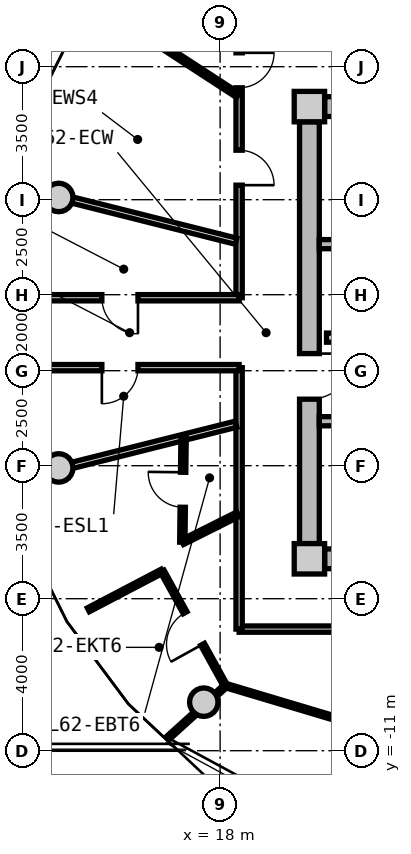
"""IFC4 building model, lengths in metres.
Left out: names, types, materials, properties, quantities, classifications, styles, units other than length and angle.
Written with IfcOpenShell. Run it as: python <this file> out.ifc"""

import sys

from ifc_helpers import new_model, si_unit, direction, frame, frame_2d, origin, origin_2d, place, context, subcontext, project, spatial, rectangle, circle, extrude, source, transform, mapped, element, fill, save


model = new_model("IFC4")
c1 = context("Model", 3, precision=1e-05, world=origin(), true_north=direction((0.0, 1.0)))
c2 = subcontext(c1, "Body", "Model", "MODEL_VIEW")
j1 = project(units=[si_unit("LENGTHUNIT", "METRE"), si_unit("PLANEANGLEUNIT", "RADIAN")], contexts=[c1])
p1 = place(None, origin())
s1 = spatial("IfcSite", under=j1, at=p1, CompositionType="ELEMENT")
p2 = place(p1, origin())
s2 = spatial("IfcBuilding", under=s1, at=p2, CompositionType="ELEMENT")
p3 = place(p2, frame((0.0, 0.0, 199.8)))
s3 = spatial("IfcBuildingStorey", under=s2, at=p3, CompositionType="ELEMENT", Elevation=199.8)
m1 = source(origin(), c2, "Body", "SweptSolid", [
    extrude(rectangle(XDim=0.8, YDim=0.8, at=origin_2d()), origin(), (0.0, 0.0, 1.0), 4.0),
])
for number, where, z_axis, x_axis in (
    (1, (20.35, -5.95, 0.0), (0.0, 0.0, 1.0), (1.0, 0.0, 0.0)),
    (2, (20.35, 5.95, 0.0), (0.0, 0.0, 1.0), (1.0, 0.0, 0.0)),
):
    element("IfcColumn", number, at=place(p3, frame(where, z_axis=z_axis, x_axis=x_axis)), inside=s3, PredefinedType="COLUMN", context=c2, shape_type="MappedRepresentation", body=[
        mapped(m1, transform((0.0, 0.0, 0.0), x_axis=(1.0, 0.0, 0.0), y_axis=(0.0, 1.0, 0.0), z_axis=(0.0, 0.0, 1.0), scale=1.0)),
    ])
m2 = source(origin(), c2, "Body", "SweptSolid", [
    extrude(rectangle(XDim=14.5, YDim=0.52, at=frame_2d((7.25, 0.0))), origin(), (0.0, 0.0, 1.0), 3.71),
])
for number, where, z_axis, x_axis in (
    (3, (20.75, 5.95, 0.0), (0.0, 0.0, 1.0), (1.0, 0.0, 0.0)),
    (4, (35.25, -5.95, 0.0), (0.0, 0.0, 1.0), (-1.0, 0.0, 0.0)),
):
    element("IfcWall", number, at=place(p3, frame(where, z_axis=z_axis, x_axis=x_axis)), inside=s3, PredefinedType="SHEAR", context=c2, shape_type="MappedRepresentation", body=[
        mapped(m2, transform((0.0, 0.0, 0.0), x_axis=(1.0, 0.0, 0.0), y_axis=(0.0, 1.0, 0.0), z_axis=(0.0, 0.0, 1.0), scale=1.0)),
    ])
m3 = source(origin(), c2, "Body", "SweptSolid", [
    extrude(rectangle(XDim=11.1, YDim=0.52, at=frame_2d((5.55, 0.0))), origin(), (0.0, 0.0, 1.0), 3.71),
])
p4 = place(p3, frame((20.35, -5.55, 0.0), z_axis=(0.0, 0.0, 1.0), x_axis=(0.0, 1.0, 0.0)))
e5 = element("IfcWall", 5, at=p4, inside=s3, PredefinedType="SHEAR", context=c2, shape_type="MappedRepresentation", body=[
    mapped(m3, transform((0.0, 0.0, 0.0), x_axis=(1.0, 0.0, 0.0), y_axis=(0.0, 1.0, 0.0), z_axis=(0.0, 0.0, 1.0), scale=1.0)),
])
p5 = place(p4, frame((3.8, 0.0, 0.0)))
e6 = element("IfcOpeningElement", 6, at=p5, cuts=e5, PredefinedType="OPENING", context=c2, shape_type="SweptSolid", body=[
    extrude(rectangle(XDim=1.2, YDim=2.15, at=frame_2d((0.6, 1.075))), frame((0.0, 0.27, 0.0), z_axis=(0.0, -1.0, 0.0), x_axis=(1.0, 0.0, 0.0)), (0.0, 0.0, 1.0), 0.54),
])
m4 = source(origin(), c2, "Body", "SweptSolid", [
    extrude(circle(Radius=0.375, at=origin_2d()), origin(), (0.0, 0.0, 1.0), 4.0),
])
for number, where, z_axis, x_axis in (
    (7, (13.753, 3.559, 0.0), (0.0, 0.0, 1.0), (1.0, 0.0, 0.0)),
    (8, (13.753, -3.559, 0.0), (0.0, 0.0, 1.0), (1.0, 0.0, 0.0)),
    (9, (17.57, -9.723, 0.0), (0.0, 0.0, 1.0), (1.0, 0.0, 0.0)),
):
    element("IfcColumn", number, at=place(p3, frame(where, z_axis=z_axis, x_axis=x_axis)), inside=s3, PredefinedType="COLUMN", context=c2, shape_type="MappedRepresentation", body=[
        mapped(m4, transform((0.0, 0.0, 0.0), x_axis=(1.0, 0.0, 0.0), y_axis=(0.0, 1.0, 0.0), z_axis=(0.0, 0.0, 1.0), scale=1.0)),
    ])
m5 = source(origin(), c2, "Body", "SweptSolid", [
    extrude(rectangle(XDim=7.93, YDim=0.24, at=frame_2d((3.965, 0.0))), origin(), (0.0, 0.0, 1.0), 3.71),
])
p6 = place(p3, frame((20.61, 2.33, 0.0), z_axis=(0.0, 0.0, 1.0), x_axis=(1.0, 0.0, 0.0)))
e10 = element("IfcWall", 10, at=p6, inside=s3, PredefinedType="PARTITIONING", context=c2, shape_type="MappedRepresentation", body=[
    mapped(m5, transform((0.0, 0.0, 0.0), x_axis=(1.0, 0.0, 0.0), y_axis=(0.0, 1.0, 0.0), z_axis=(0.0, 0.0, 1.0), scale=1.0)),
])
p7 = place(p3, frame((20.61, -2.33, 0.0), z_axis=(0.0, 0.0, 1.0), x_axis=(1.0, 0.0, 0.0)))
e11 = element("IfcWall", 11, at=p7, inside=s3, PredefinedType="PARTITIONING", context=c2, shape_type="MappedRepresentation", body=[
    mapped(m5, transform((0.0, 0.0, 0.0), x_axis=(1.0, 0.0, 0.0), y_axis=(0.0, 1.0, 0.0), z_axis=(0.0, 0.0, 1.0), scale=1.0)),
])
p8 = place(p7, frame((1.05, 0.0, 0.0)))
e12 = element("IfcOpeningElement", 12, at=p8, cuts=e11, PredefinedType="OPENING", context=c2, shape_type="SweptSolid", body=[
    extrude(rectangle(XDim=1.1, YDim=2.15, at=frame_2d((0.55, 1.075))), frame((0.0, 0.13, 0.0), z_axis=(0.0, -1.0, 0.0), x_axis=(1.0, 0.0, 0.0)), (0.0, 0.0, 1.0), 0.26),
])
m6 = source(origin(), c2, "Body", "SweptSolid", [
    extrude(rectangle(XDim=7.62, YDim=0.24, at=frame_2d((3.81, 0.0))), origin(), (0.0, 0.0, 1.0), 3.695),
])
p9 = place(p3, frame((20.8, -0.13, 0.0), z_axis=(0.0, 0.0, 1.0), x_axis=(1.0, 0.0, 0.0)))
e13 = element("IfcWall", 13, at=p9, inside=s3, PredefinedType="PARTITIONING", context=c2, shape_type="MappedRepresentation", body=[
    mapped(m6, transform((0.0, 0.0, 0.0), x_axis=(1.0, 0.0, 0.0), y_axis=(0.0, 1.0, 0.0), z_axis=(0.0, 0.0, 1.0), scale=1.0)),
])
p10 = place(p9, frame((6.22, 0.0, 0.0)))
e14 = element("IfcOpeningElement", 14, at=p10, cuts=e13, PredefinedType="OPENING", context=c2, shape_type="SweptSolid", body=[
    extrude(rectangle(XDim=1.0, YDim=2.1, at=frame_2d((0.5, 1.05))), frame((0.0, 0.13, 0.0), z_axis=(0.0, -1.0, 0.0), x_axis=(1.0, 0.0, 0.0)), (0.0, 0.0, 1.0), 0.26),
])
p11 = place(p9, frame((2.4, 0.0, 0.0)))
e15 = element("IfcOpeningElement", 15, at=p11, cuts=e13, PredefinedType="OPENING", context=c2, shape_type="SweptSolid", body=[
    extrude(rectangle(XDim=1.0, YDim=2.1, at=frame_2d((0.5, 1.05))), frame((0.0, 0.13, 0.0), z_axis=(0.0, -1.0, 0.0), x_axis=(1.0, 0.0, 0.0)), (0.0, 0.0, 1.0), 0.26),
])
m7 = source(origin(), c2, "Body", "SweptSolid", [
    extrude(rectangle(XDim=19.0, YDim=0.165, at=frame_2d((9.5, 0.0))), origin(), (0.0, 0.0, 1.0), 3.695),
])
p12 = place(p3, frame((37.5, -7.8, 0.0), z_axis=(0.0, 0.0, 1.0), x_axis=(-1.0, 0.0, 0.0)))
e16 = element("IfcWall", 16, at=p12, inside=s3, PredefinedType="PARTITIONING", context=c2, shape_type="MappedRepresentation", body=[
    mapped(m7, transform((0.0, 0.0, 0.0), x_axis=(1.0, 0.0, 0.0), y_axis=(0.0, 1.0, 0.0), z_axis=(0.0, 0.0, 1.0), scale=1.0)),
])
p13 = place(p12, frame((9.392, 0.0, 0.0)))
e17 = element("IfcOpeningElement", 17, at=p13, cuts=e16, PredefinedType="OPENING", context=c2, shape_type="SweptSolid", body=[
    extrude(rectangle(XDim=1.05, YDim=2.15, at=frame_2d((0.525, 1.075))), frame((0.0, 0.093, 0.0), z_axis=(0.0, -1.0, 0.0), x_axis=(1.0, 0.0, 0.0)), (0.0, 0.0, 1.0), 0.185),
])
m8 = source(origin(), c2, "Body", "SweptSolid", [
    extrude(rectangle(XDim=6.88, YDim=0.165, at=frame_2d((3.44, 0.0))), origin(), (0.0, 0.0, 1.0), 3.695),
])
p14 = place(p3, frame((18.5, -7.8, 0.0), z_axis=(0.0, 0.0, 1.0), x_axis=(0.0, 1.0, 0.0)))
e18 = element("IfcWall", 18, at=p14, inside=s3, PredefinedType="PARTITIONING", context=c2, shape_type="MappedRepresentation", body=[
    mapped(m8, transform((0.0, 0.0, 0.0), x_axis=(1.0, 0.0, 0.0), y_axis=(0.0, 1.0, 0.0), z_axis=(0.0, 0.0, 1.0), scale=1.0)),
])
p15 = place(p3, frame((18.5, 0.92, 0.0), z_axis=(0.0, 0.0, 1.0), x_axis=(0.0, 1.0, 0.0)))
e19 = element("IfcWall", 19, at=p15, inside=s3, PredefinedType="PARTITIONING", context=c2, shape_type="MappedRepresentation", body=[
    mapped(m8, transform((0.0, 0.0, 0.0), x_axis=(1.0, 0.0, 0.0), y_axis=(0.0, 1.0, 0.0), z_axis=(0.0, 0.0, 1.0), scale=1.0)),
])
p16 = place(p15, frame((5.525, 0.0, 0.0)))
e20 = element("IfcOpeningElement", 20, at=p16, cuts=e19, PredefinedType="OPENING", context=c2, shape_type="SweptSolid", body=[
    extrude(rectangle(XDim=0.92, YDim=2.1, at=frame_2d((0.46, 1.05))), frame((0.0, 0.093, 0.0), z_axis=(0.0, -1.0, 0.0), x_axis=(1.0, 0.0, 0.0)), (0.0, 0.0, 1.0), 0.185),
])
p17 = place(p15, frame((2.962, 0.0, 0.0)))
e21 = element("IfcOpeningElement", 21, at=p17, cuts=e19, PredefinedType="OPENING", context=c2, shape_type="SweptSolid", body=[
    extrude(rectangle(XDim=0.92, YDim=2.1, at=frame_2d((0.46, 1.05))), frame((0.0, 0.093, 0.0), z_axis=(0.0, -1.0, 0.0), x_axis=(1.0, 0.0, 0.0)), (0.0, 0.0, 1.0), 0.185),
])
m9 = source(origin(), c2, "Body", "SweptSolid", [
    extrude(rectangle(XDim=6.157, YDim=0.165, at=frame_2d((3.079, 0.0))), origin(), (0.0, 0.0, 1.0), 3.295),
])
for number, where, z_axis, x_axis in (
    (22, (18.42, 2.407, 0.0), (0.0, 0.0, 1.0), (-0.97, 0.244, 0.0)),
    (23, (18.42, -2.407, 0.0), (0.0, 0.0, 1.0), (-0.97, -0.244, 0.0)),
):
    element("IfcWall", number, at=place(p3, frame(where, z_axis=z_axis, x_axis=x_axis)), inside=s3, PredefinedType="PARTITIONING", context=c2, shape_type="MappedRepresentation", body=[
        mapped(m9, transform((0.0, 0.0, 0.0), x_axis=(1.0, 0.0, 0.0), y_axis=(0.0, 1.0, 0.0), z_axis=(0.0, 0.0, 1.0), scale=1.0)),
    ])
m10 = source(origin(), c2, "Body", "SweptSolid", [
    extrude(rectangle(XDim=3.904, YDim=0.14, at=frame_2d((1.952, 0.0))), origin(), (0.0, 0.0, 1.0), 3.695),
])
p18 = place(p3, frame((18.47, 6.246, 0.0), z_axis=(0.0, 0.0, 1.0), x_axis=(-0.838024687996, 0.545632314209, 0.0)))
e24 = element("IfcWall", 24, at=p18, inside=s3, PredefinedType="PARTITIONING", context=c2, shape_type="MappedRepresentation", body=[
    mapped(m10, transform((0.0, 0.0, 0.0), x_axis=(1.0, 0.0, 0.0), y_axis=(0.0, 1.0, 0.0), z_axis=(0.0, 0.0, 1.0), scale=1.0)),
])
m11 = source(origin(), c2, "Body", "SweptSolid", [
    extrude(rectangle(XDim=6.936, YDim=0.115, at=frame_2d((3.468, 0.0))), origin(), (0.0, 0.0, 1.0), 3.695),
])
p19 = place(p3, frame((18.151, -9.287, 0.0), z_axis=(0.0, 0.0, 1.0), x_axis=(0.958186895835, -0.286143098205, 0.0)))
e25 = element("IfcWall", 25, at=p19, inside=s3, PredefinedType="PARTITIONING", context=c2, shape_type="MappedRepresentation", body=[
    mapped(m11, transform((0.0, 0.0, 0.0), x_axis=(1.0, 0.0, 0.0), y_axis=(0.0, 1.0, 0.0), z_axis=(0.0, 0.0, 1.0), scale=1.0)),
])
p20 = place(p19, frame((2.993, 0.0, 0.0)))
e26 = element("IfcOpeningElement", 26, at=p20, cuts=e25, PredefinedType="OPENING", context=c2, shape_type="SweptSolid", body=[
    extrude(rectangle(XDim=0.95, YDim=2.1, at=frame_2d((0.475, 1.05))), frame((0.0, 0.067, 0.0), z_axis=(0.0, -1.0, 0.0), x_axis=(1.0, 0.0, 0.0)), (0.0, 0.0, 1.0), 0.135),
])
m12 = source(origin(), c2, "Body", "SweptSolid", [
    extrude(rectangle(XDim=2.072, YDim=0.115, at=frame_2d((1.036, 0.0))), origin(), (0.0, 0.0, 1.0), 3.295),
])
p21 = place(p3, frame((18.151, -9.287, 0.0), z_axis=(0.0, 0.0, 1.0), x_axis=(-0.741410125356, -0.671052178314, 0.0)))
e27 = element("IfcWall", 27, at=p21, inside=s3, PredefinedType="PARTITIONING", context=c2, shape_type="MappedRepresentation", body=[
    mapped(m12, transform((0.0, 0.0, 0.0), x_axis=(1.0, 0.0, 0.0), y_axis=(0.0, 1.0, 0.0), z_axis=(0.0, 0.0, 1.0), scale=1.0)),
])
m13 = source(origin(), c2, "Body", "SweptSolid", [
    extrude(rectangle(XDim=1.638, YDim=0.14, at=frame_2d((0.819, 0.0))), origin(), (0.0, 0.0, 1.0), 3.695),
])
p22 = place(p3, frame((18.47, -4.778, 0.0), z_axis=(0.0, 0.0, 1.0), x_axis=(-0.893919977945, -0.448226586707, 0.0)))
e28 = element("IfcWall", 28, at=p22, inside=s3, PredefinedType="PARTITIONING", context=c2, shape_type="MappedRepresentation", body=[
    mapped(m13, transform((0.0, 0.0, 0.0), x_axis=(1.0, 0.0, 0.0), y_axis=(0.0, 1.0, 0.0), z_axis=(0.0, 0.0, 1.0), scale=1.0)),
])
m14 = source(origin(), c2, "Body", "SweptSolid", [
    extrude(rectangle(XDim=2.759, YDim=0.14, at=frame_2d((1.379, 0.0))), origin(), (0.0, 0.0, 1.0), 3.695),
])
p23 = place(p3, frame((17.005, -5.513, 0.0), z_axis=(0.0, 0.0, 1.0), x_axis=(0.01194710728, 0.999928630767, 0.0)))
e29 = element("IfcWall", 29, at=p23, inside=s3, PredefinedType="PARTITIONING", context=c2, shape_type="MappedRepresentation", body=[
    mapped(m14, transform((0.0, 0.0, 0.0), x_axis=(1.0, 0.0, 0.0), y_axis=(0.0, 1.0, 0.0), z_axis=(0.0, 0.0, 1.0), scale=1.0)),
])
p24 = place(p23, frame((0.919, 0.0, 0.0)))
e30 = element("IfcOpeningElement", 30, at=p24, cuts=e29, PredefinedType="OPENING", context=c2, shape_type="SweptSolid", body=[
    extrude(rectangle(XDim=0.92, YDim=2.1, at=frame_2d((0.46, 1.05))), frame((0.0, 0.08, 0.0), z_axis=(0.0, -1.0, 0.0), x_axis=(1.0, 0.0, 0.0)), (0.0, 0.0, 1.0), 0.16),
])
m15 = source(origin(), c2, "Body", "SweptSolid", [
    extrude(rectangle(XDim=2.193, YDim=0.115, at=frame_2d((1.097, 0.0))), origin(), (0.0, 0.0, 1.0), 3.695),
])
p25 = place(p3, frame((16.475, -6.275, 0.0), z_axis=(0.0, 0.0, 1.0), x_axis=(-0.885783595046, -0.464098505435, 0.0)))
e31 = element("IfcWall", 31, at=p25, inside=s3, PredefinedType="PARTITIONING", context=c2, shape_type="MappedRepresentation", body=[
    mapped(m15, transform((0.0, 0.0, 0.0), x_axis=(1.0, 0.0, 0.0), y_axis=(0.0, 1.0, 0.0), z_axis=(0.0, 0.0, 1.0), scale=1.0)),
])
m16 = source(origin(), c2, "Body", "SweptSolid", [
    extrude(rectangle(XDim=3.45, YDim=0.115, at=frame_2d((1.725, 0.0))), origin(), (0.0, 0.0, 1.0), 3.695),
])
p26 = place(p3, frame((16.475, -6.275, 0.0), z_axis=(0.0, 0.0, 1.0), x_axis=(0.483659007882, -0.875256513312, 0.0)))
e32 = element("IfcWall", 32, at=p26, inside=s3, PredefinedType="PARTITIONING", context=c2, shape_type="MappedRepresentation", body=[
    mapped(m16, transform((0.0, 0.0, 0.0), x_axis=(1.0, 0.0, 0.0), y_axis=(0.0, 1.0, 0.0), z_axis=(0.0, 0.0, 1.0), scale=1.0)),
])
p27 = place(p26, frame((1.25, 0.0, 0.0)))
e33 = element("IfcOpeningElement", 33, at=p27, cuts=e32, PredefinedType="OPENING", context=c2, shape_type="SweptSolid", body=[
    extrude(rectangle(XDim=0.95, YDim=2.1, at=frame_2d((0.475, 1.05))), frame((0.0, 0.067, 0.0), z_axis=(0.0, -1.0, 0.0), x_axis=(1.0, 0.0, 0.0)), (0.0, 0.0, 1.0), 0.135),
])
m17 = source(origin(), c2, "Body", "SweptSolid", [
    extrude(rectangle(XDim=37.0, YDim=0.165, at=frame_2d((18.5, 0.0))), origin(), (0.0, 0.0, 1.0), 3.695),
])
p28 = place(p3, frame((-18.5, -0.92, 0.0), z_axis=(0.0, 0.0, 1.0), x_axis=(1.0, 0.0, 0.0)))
e34 = element("IfcWall", 34, at=p28, inside=s3, PredefinedType="PARTITIONING", context=c2, shape_type="MappedRepresentation", body=[
    mapped(m17, transform((0.0, 0.0, 0.0), x_axis=(1.0, 0.0, 0.0), y_axis=(0.0, 1.0, 0.0), z_axis=(0.0, 0.0, 1.0), scale=1.0)),
])
p29 = place(p28, frame((2.662, 0.0, 0.0)))
e35 = element("IfcOpeningElement", 35, at=p29, cuts=e34, PredefinedType="OPENING", context=c2, shape_type="SweptSolid", body=[
    extrude(rectangle(XDim=0.95, YDim=2.1, at=frame_2d((0.475, 1.05))), frame((0.0, 0.093, 0.0), z_axis=(0.0, -1.0, 0.0), x_axis=(1.0, 0.0, 0.0)), (0.0, 0.0, 1.0), 0.185),
])
p30 = place(p28, frame((33.388, 0.0, 0.0)))
e36 = element("IfcOpeningElement", 36, at=p30, cuts=e34, PredefinedType="OPENING", context=c2, shape_type="SweptSolid", body=[
    extrude(rectangle(XDim=0.95, YDim=2.1, at=frame_2d((0.475, 1.05))), frame((0.0, 0.093, 0.0), z_axis=(0.0, -1.0, 0.0), x_axis=(1.0, 0.0, 0.0)), (0.0, 0.0, 1.0), 0.185),
])
p31 = place(p28, frame((9.075, 0.0, 0.0)))
e37 = element("IfcOpeningElement", 37, at=p31, cuts=e34, PredefinedType="OPENING", context=c2, shape_type="SweptSolid", body=[
    extrude(rectangle(XDim=1.25, YDim=2.2, at=frame_2d((0.625, 1.1))), frame((0.0, 0.093, 0.0), z_axis=(0.0, -1.0, 0.0), x_axis=(1.0, 0.0, 0.0)), (0.0, 0.0, 1.0), 0.185),
])
p32 = place(p28, frame((17.875, 0.0, 0.0)))
e38 = element("IfcOpeningElement", 38, at=p32, cuts=e34, PredefinedType="OPENING", context=c2, shape_type="SweptSolid", body=[
    extrude(rectangle(XDim=1.25, YDim=2.2, at=frame_2d((0.625, 1.1))), frame((0.0, 0.093, 0.0), z_axis=(0.0, -1.0, 0.0), x_axis=(1.0, 0.0, 0.0)), (0.0, 0.0, 1.0), 0.185),
])
p33 = place(p28, frame((26.675, 0.0, 0.0)))
e39 = element("IfcOpeningElement", 39, at=p33, cuts=e34, PredefinedType="OPENING", context=c2, shape_type="SweptSolid", body=[
    extrude(rectangle(XDim=1.25, YDim=2.2, at=frame_2d((0.625, 1.1))), frame((0.0, 0.093, 0.0), z_axis=(0.0, -1.0, 0.0), x_axis=(1.0, 0.0, 0.0)), (0.0, 0.0, 1.0), 0.185),
])
p34 = place(p3, frame((-18.5, 0.92, 0.0), z_axis=(0.0, 0.0, 1.0), x_axis=(1.0, 0.0, 0.0)))
e40 = element("IfcWall", 40, at=p34, inside=s3, PredefinedType="PARTITIONING", context=c2, shape_type="MappedRepresentation", body=[
    mapped(m17, transform((0.0, 0.0, 0.0), x_axis=(1.0, 0.0, 0.0), y_axis=(0.0, 1.0, 0.0), z_axis=(0.0, 0.0, 1.0), scale=1.0)),
])
p35 = place(p34, frame((2.662, 0.0, 0.0)))
e41 = element("IfcOpeningElement", 41, at=p35, cuts=e40, PredefinedType="OPENING", context=c2, shape_type="SweptSolid", body=[
    extrude(rectangle(XDim=0.95, YDim=2.1, at=frame_2d((0.475, 1.05))), frame((0.0, 0.093, 0.0), z_axis=(0.0, -1.0, 0.0), x_axis=(1.0, 0.0, 0.0)), (0.0, 0.0, 1.0), 0.185),
])
p36 = place(p34, frame((33.388, 0.0, 0.0)))
e42 = element("IfcOpeningElement", 42, at=p36, cuts=e40, PredefinedType="OPENING", context=c2, shape_type="SweptSolid", body=[
    extrude(rectangle(XDim=0.95, YDim=2.1, at=frame_2d((0.475, 1.05))), frame((0.0, 0.093, 0.0), z_axis=(0.0, -1.0, 0.0), x_axis=(1.0, 0.0, 0.0)), (0.0, 0.0, 1.0), 0.185),
])
p37 = place(p34, frame((7.64, 0.0, 0.0)))
e43 = element("IfcOpeningElement", 43, at=p37, cuts=e40, PredefinedType="OPENING", context=c2, shape_type="SweptSolid", body=[
    extrude(rectangle(XDim=0.92, YDim=2.1, at=frame_2d((0.46, 1.05))), frame((0.0, 0.093, 0.0), z_axis=(0.0, -1.0, 0.0), x_axis=(1.0, 0.0, 0.0)), (0.0, 0.0, 1.0), 0.185),
])
p38 = place(p34, frame((10.275, 0.0, 0.0)))
e44 = element("IfcOpeningElement", 44, at=p38, cuts=e40, PredefinedType="OPENING", context=c2, shape_type="SweptSolid", body=[
    extrude(rectangle(XDim=1.25, YDim=2.2, at=frame_2d((0.625, 1.1))), frame((0.0, 0.093, 0.0), z_axis=(0.0, -1.0, 0.0), x_axis=(1.0, 0.0, 0.0)), (0.0, 0.0, 1.0), 0.185),
])
p39 = place(p34, frame((17.875, 0.0, 0.0)))
e45 = element("IfcOpeningElement", 45, at=p39, cuts=e40, PredefinedType="OPENING", context=c2, shape_type="SweptSolid", body=[
    extrude(rectangle(XDim=1.25, YDim=2.2, at=frame_2d((0.625, 1.1))), frame((0.0, 0.093, 0.0), z_axis=(0.0, -1.0, 0.0), x_axis=(1.0, 0.0, 0.0)), (0.0, 0.0, 1.0), 0.185),
])
p40 = place(p34, frame((26.675, 0.0, 0.0)))
e46 = element("IfcOpeningElement", 46, at=p40, cuts=e40, PredefinedType="OPENING", context=c2, shape_type="SweptSolid", body=[
    extrude(rectangle(XDim=1.25, YDim=2.2, at=frame_2d((0.625, 1.1))), frame((0.0, 0.093, 0.0), z_axis=(0.0, -1.0, 0.0), x_axis=(1.0, 0.0, 0.0)), (0.0, 0.0, 1.0), 0.185),
])
m18 = source(origin(), c2, "Body", "SweptSolid", [
    extrude(rectangle(XDim=1.2, YDim=2.15, at=frame_2d((0.6, 1.075))), frame((0.0, 0.025, 0.0), z_axis=(0.0, -1.0, 0.0), x_axis=(1.0, 0.0, 0.0)), (0.0, 0.0, 1.0), 0.05),
])
p41 = place(p5, frame((1.2, 0.0, 0.0), z_axis=(0.0, 0.0, 1.0), x_axis=(-1.0, 0.0, 0.0)))
e47 = element("IfcDoor", 47, at=p41, inside=s3, OperationType="SINGLE_SWING_LEFT", PredefinedType="DOOR", context=c2, shape_type="MappedRepresentation", body=[
    mapped(m18, transform((0.0, 0.0, 0.0), x_axis=(1.0, 0.0, 0.0), y_axis=(0.0, 1.0, 0.0), z_axis=(0.0, 0.0, 1.0), scale=1.0)),
])
fill(e6, e47)
m19 = source(origin(), c2, "Body", "SweptSolid", [
    extrude(rectangle(XDim=0.95, YDim=2.1, at=frame_2d((0.475, 1.05))), frame((0.0, 0.025, 0.0), z_axis=(0.0, -1.0, 0.0), x_axis=(1.0, 0.0, 0.0)), (0.0, 0.0, 1.0), 0.05),
])
p42 = place(p30, frame((0.95, 0.0, 0.0), z_axis=(0.0, 0.0, 1.0), x_axis=(-1.0, 0.0, 0.0)))
e48 = element("IfcDoor", 48, at=p42, inside=s3, OperationType="SINGLE_SWING_RIGHT", PredefinedType="DOOR", context=c2, shape_type="MappedRepresentation", body=[
    mapped(m19, transform((0.0, 0.0, 0.0), x_axis=(1.0, 0.0, 0.0), y_axis=(0.0, 1.0, 0.0), z_axis=(0.0, 0.0, 1.0), scale=1.0)),
])
fill(e36, e48)
p43 = place(p36, frame((0.95, 0.0, 0.0), z_axis=(0.0, 0.0, 1.0), x_axis=(-1.0, 0.0, 0.0)))
e49 = element("IfcDoor", 49, at=p43, inside=s3, OperationType="SINGLE_SWING_LEFT", PredefinedType="DOOR", context=c2, shape_type="MappedRepresentation", body=[
    mapped(m19, transform((0.0, 0.0, 0.0), x_axis=(1.0, 0.0, 0.0), y_axis=(0.0, 1.0, 0.0), z_axis=(0.0, 0.0, 1.0), scale=1.0)),
])
fill(e42, e49)
m20 = source(origin(), c2, "Body", "SweptSolid", [
    extrude(rectangle(XDim=0.92, YDim=2.1, at=frame_2d((0.46, 1.05))), frame((0.0, 0.025, 0.0), z_axis=(0.0, -1.0, 0.0), x_axis=(1.0, 0.0, 0.0)), (0.0, 0.0, 1.0), 0.05),
])
p44 = place(p16, frame((0.92, 0.0, 0.0), z_axis=(0.0, 0.0, 1.0), x_axis=(-1.0, 0.0, 0.0)))
e50 = element("IfcDoor", 50, at=p44, inside=s3, OperationType="SINGLE_SWING_LEFT", PredefinedType="DOOR", context=c2, shape_type="MappedRepresentation", body=[
    mapped(m20, transform((0.0, 0.0, 0.0), x_axis=(1.0, 0.0, 0.0), y_axis=(0.0, 1.0, 0.0), z_axis=(0.0, 0.0, 1.0), scale=1.0)),
])
fill(e20, e50)
p45 = place(p17, frame((0.92, 0.0, 0.0), z_axis=(0.0, 0.0, 1.0), x_axis=(-1.0, 0.0, 0.0)))
e51 = element("IfcDoor", 51, at=p45, inside=s3, OperationType="SINGLE_SWING_RIGHT", PredefinedType="DOOR", context=c2, shape_type="MappedRepresentation", body=[
    mapped(m20, transform((0.0, 0.0, 0.0), x_axis=(1.0, 0.0, 0.0), y_axis=(0.0, 1.0, 0.0), z_axis=(0.0, 0.0, 1.0), scale=1.0)),
])
fill(e21, e51)
p46 = place(p24, origin())
e52 = element("IfcDoor", 52, at=p46, inside=s3, OperationType="SINGLE_SWING_RIGHT", PredefinedType="DOOR", context=c2, shape_type="MappedRepresentation", body=[
    mapped(m20, transform((0.0, 0.0, 0.0), x_axis=(1.0, 0.0, 0.0), y_axis=(0.0, 1.0, 0.0), z_axis=(0.0, 0.0, 1.0), scale=1.0)),
])
fill(e30, e52)
p47 = place(p27, frame((0.95, 0.0, 0.0), z_axis=(0.0, 0.0, 1.0), x_axis=(-1.0, 0.0, 0.0)))
e53 = element("IfcDoor", 53, at=p47, inside=s3, OperationType="SINGLE_SWING_LEFT", PredefinedType="DOOR", context=c2, shape_type="MappedRepresentation", body=[
    mapped(m19, transform((0.0, 0.0, 0.0), x_axis=(1.0, 0.0, 0.0), y_axis=(0.0, 1.0, 0.0), z_axis=(0.0, 0.0, 1.0), scale=1.0)),
])
fill(e33, e53)
save(model, sys.argv[1])
